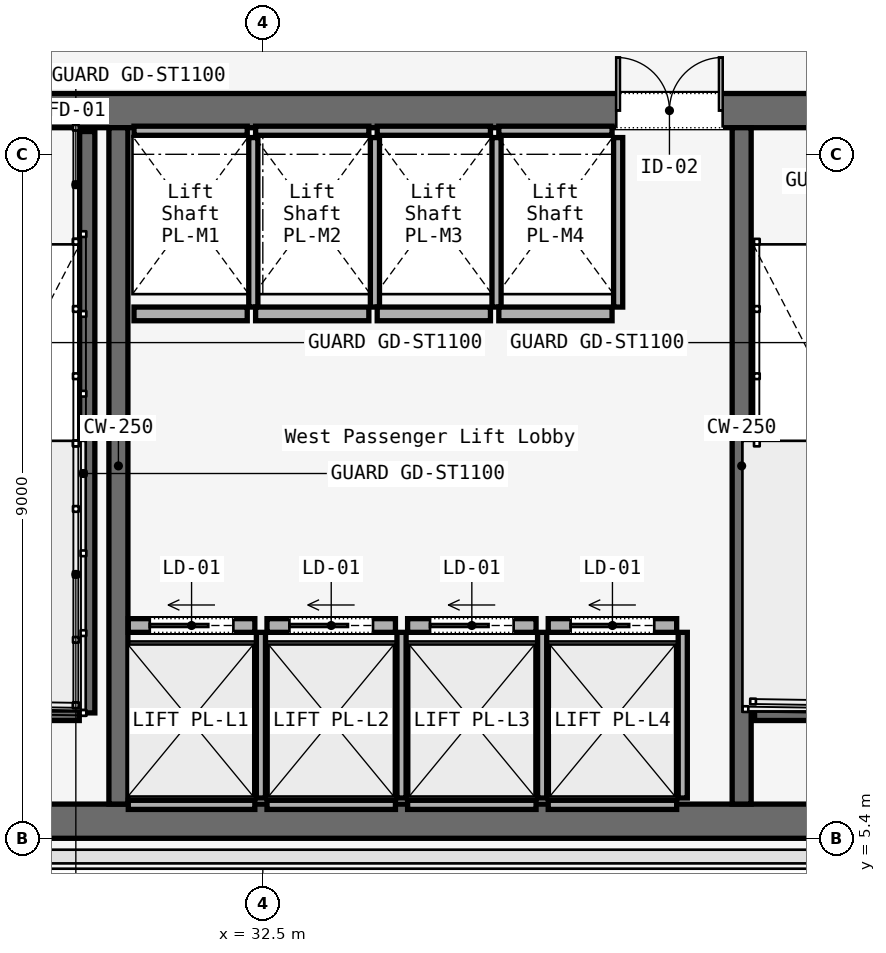
"""IFC4 building model, lengths in metres.
Left out: names, types, materials, properties, quantities, classifications, styles, units other than length and angle.
Written with IfcOpenShell. Run it as: python <this file> out.ifc"""

import sys

from ifc_helpers import new_model, si_unit, direction, frame, frame_2d, origin, place, context, subcontext, project, spatial, rectangle, extrude, element, fill, save


model = new_model("IFC4")
c1 = context("Model", 3, precision=1e-05, world=origin(), true_north=direction((0.0, 1.0)))
c2 = subcontext(c1, "Body", "Model", "MODEL_VIEW")
j1 = project(units=[si_unit("LENGTHUNIT", "METRE"), si_unit("PLANEANGLEUNIT", "RADIAN")], contexts=[c1])
p1 = place(None, origin())
s1 = spatial("IfcSite", under=j1, at=p1, CompositionType="ELEMENT")
p2 = place(p1, origin())
s2 = spatial("IfcBuilding", under=s1, at=p2, CompositionType="ELEMENT")
p3 = place(p2, frame((0.0, 0.0, 51.2)))
s3 = spatial("IfcBuildingStorey", under=s2, at=p3, CompositionType="ELEMENT", Elevation=51.2)
p4 = place(p3, frame((26.45, 14.975, 0.0), z_axis=(0.0, 0.0, 1.0), x_axis=(1.0, 0.0, 0.0)))
e1 = element("IfcWall", 1, at=p4, inside=s3, PredefinedType="SOLIDWALL", context=c2, shape_type="SweptSolid", body=[
    extrude(rectangle(XDim=31.1, YDim=0.45, at=frame_2d((15.55, 0.0))), origin(), (0.0, 0.0, 1.0), 3.58),
])
p5 = place(p4, frame((1.65, 0.0, 0.0)))
e2 = element("IfcOpeningElement", 2, at=p5, cuts=e1, PredefinedType="OPENING", context=c2, shape_type="SweptSolid", body=[
    extrude(rectangle(XDim=1.1, YDim=2.2, at=frame_2d((0.55, 1.1))), frame((0.0, 0.225, 0.0), z_axis=(0.0, -1.0, 0.0), x_axis=(1.0, 0.0, 0.0)), (0.0, 0.0, 1.0), 0.45),
])
p6 = place(p4, frame((13.65, 0.0, 0.0)))
e3 = element("IfcOpeningElement", 3, at=p6, cuts=e1, PredefinedType="OPENING", context=c2, shape_type="SweptSolid", body=[
    extrude(rectangle(XDim=1.1, YDim=2.2, at=frame_2d((0.55, 1.1))), frame((0.0, 0.225, 0.0), z_axis=(0.0, -1.0, 0.0), x_axis=(1.0, 0.0, 0.0)), (0.0, 0.0, 1.0), 0.45),
])
p7 = place(p4, frame((25.55, 0.0, 0.0)))
e4 = element("IfcOpeningElement", 4, at=p7, cuts=e1, PredefinedType="OPENING", context=c2, shape_type="SweptSolid", body=[
    extrude(rectangle(XDim=1.1, YDim=2.2, at=frame_2d((0.55, 1.1))), frame((0.0, 0.225, 0.0), z_axis=(0.0, -1.0, 0.0), x_axis=(1.0, 0.0, 0.0)), (0.0, 0.0, 1.0), 0.45),
])
p8 = place(p4, frame((10.7, 0.0, 0.0)))
e5 = element("IfcOpeningElement", 5, at=p8, cuts=e1, PredefinedType="OPENING", context=c2, shape_type="SweptSolid", body=[
    extrude(rectangle(XDim=1.4, YDim=2.2, at=frame_2d((0.7, 1.1))), frame((0.0, 0.225, 0.0), z_axis=(0.0, -1.0, 0.0), x_axis=(1.0, 0.0, 0.0)), (0.0, 0.0, 1.0), 0.45),
])
p9 = place(p4, frame((19.35, 0.0, 0.0)))
e6 = element("IfcOpeningElement", 6, at=p9, cuts=e1, PredefinedType="OPENING", context=c2, shape_type="SweptSolid", body=[
    extrude(rectangle(XDim=1.1, YDim=2.2, at=frame_2d((0.55, 1.1))), frame((0.0, 0.225, 0.0), z_axis=(0.0, -1.0, 0.0), x_axis=(1.0, 0.0, 0.0)), (0.0, 0.0, 1.0), 0.45),
])
p10 = place(p4, frame((21.4, 0.0, 0.0)))
e7 = element("IfcOpeningElement", 7, at=p10, cuts=e1, PredefinedType="OPENING", context=c2, shape_type="SweptSolid", body=[
    extrude(rectangle(XDim=0.9, YDim=2.1, at=frame_2d((0.45, 1.05))), frame((0.0, 0.225, 0.0), z_axis=(0.0, -1.0, 0.0), x_axis=(1.0, 0.0, 0.0)), (0.0, 0.0, 1.0), 0.45),
])
p11 = place(p4, frame((23.35, 0.0, 0.0)))
e8 = element("IfcOpeningElement", 8, at=p11, cuts=e1, PredefinedType="OPENING", context=c2, shape_type="SweptSolid", body=[
    extrude(rectangle(XDim=1.3, YDim=2.3, at=frame_2d((0.65, 1.15))), frame((0.0, 0.225, 0.0), z_axis=(0.0, -1.0, 0.0), x_axis=(1.0, 0.0, 0.0)), (0.0, 0.0, 1.0), 0.45),
])
p12 = place(p3, frame((26.45, 5.625, 0.0), z_axis=(0.0, 0.0, 1.0), x_axis=(1.0, 0.0, 0.0)))
e9 = element("IfcWall", 9, at=p12, inside=s3, PredefinedType="SOLIDWALL", context=c2, shape_type="SweptSolid", body=[
    extrude(rectangle(XDim=31.1, YDim=0.45, at=frame_2d((15.55, 0.0))), origin(), (0.0, 0.0, 1.0), 3.58),
])
for number, where, z_axis, x_axis in (
    (10, (30.6, 5.85, 0.0), (0.0, 0.0, 1.0), (0.0, 1.0, 0.0)),
    (11, (38.8, 5.85, 0.0), (0.0, 0.0, 1.0), (0.0, 1.0, 0.0)),
):
    element("IfcWall", number, at=place(p3, frame(where, z_axis=z_axis, x_axis=x_axis)), inside=s3, PredefinedType="SOLIDWALL", context=c2, shape_type="SweptSolid", body=[
        extrude(rectangle(XDim=8.9, YDim=0.25, at=frame_2d((4.45, 0.0))), origin(), (0.0, 0.0, 1.0), 3.58),
    ])
p13 = place(p3, frame((30.19, 14.7, 0.0), z_axis=(0.0, 0.0, 1.0), x_axis=(0.0, -1.0, 0.0)))
e12 = element("IfcWall", 12, at=p13, inside=s3, PredefinedType="SOLIDWALL", context=c2, shape_type="SweptSolid", body=[
    extrude(rectangle(XDim=7.65, YDim=0.2, at=frame_2d((3.825, 0.0))), origin(), (0.0, 0.0, 1.0), 3.8),
])
for number, where, z_axis, x_axis in (
    (13, (26.97, 7.05, 0.0), (0.0, 0.0, 1.0), (1.0, 0.0, 0.0)),
    (14, (38.97, 7.05, 0.0), (0.0, 0.0, 1.0), (1.0, 0.0, 0.0)),
):
    element("IfcWall", number, at=place(p3, frame(where, z_axis=z_axis, x_axis=x_axis)), inside=s3, PredefinedType="SOLIDWALL", context=c2, shape_type="SweptSolid", body=[
        extrude(rectangle(XDim=3.115, YDim=0.2, at=frame_2d((1.558, 0.0))), origin(), (0.0, 0.0, 1.0), 3.8),
    ])
p14 = place(p3, frame((30.73, 8.2, 0.0), z_axis=(0.0, 0.0, 1.0), x_axis=(1.0, 0.0, 0.0)))
e15 = element("IfcWall", 15, at=p14, inside=s3, PredefinedType="SOLIDWALL", context=c2, shape_type="SweptSolid", body=[
    extrude(rectangle(XDim=1.665, YDim=0.18, at=frame_2d((0.833, 0.0))), origin(), (0.0, 0.0, 1.0), 2.933),
])
p15 = place(p14, frame((0.282, 0.0, 0.0)))
e16 = element("IfcOpeningElement", 16, at=p15, cuts=e15, PredefinedType="OPENING", context=c2, shape_type="SweptSolid", body=[
    extrude(rectangle(XDim=1.1, YDim=2.2, at=frame_2d((0.55, 1.1))), frame((0.0, 0.09, 0.0), z_axis=(0.0, -1.0, 0.0), x_axis=(1.0, 0.0, 0.0)), (0.0, 0.0, 1.0), 0.18),
])
p16 = place(p3, frame((30.73, 5.84, 0.0), z_axis=(0.0, 0.0, 1.0), x_axis=(1.0, 0.0, 0.0)))
e17 = element("IfcWall", 17, at=p16, inside=s3, PredefinedType="SOLIDWALL", context=c2, shape_type="SweptSolid", body=[
    extrude(rectangle(XDim=1.665, YDim=0.12, at=frame_2d((0.833, 0.0))), origin(), (0.0, 0.0, 1.0), 2.933),
])
p17 = place(p3, frame((32.475, 5.93, 0.0), z_axis=(0.0, 0.0, 1.0), x_axis=(0.0, 1.0, 0.0)))
e18 = element("IfcWall", 18, at=p17, inside=s3, PredefinedType="SOLIDWALL", context=c2, shape_type="SweptSolid", body=[
    extrude(rectangle(XDim=2.18, YDim=0.12, at=frame_2d((1.09, 0.0))), origin(), (0.0, 0.0, 1.0), 2.933),
])
p18 = place(p3, frame((32.555, 8.2, 0.0), z_axis=(0.0, 0.0, 1.0), x_axis=(1.0, 0.0, 0.0)))
e19 = element("IfcWall", 19, at=p18, inside=s3, PredefinedType="SOLIDWALL", context=c2, shape_type="SweptSolid", body=[
    extrude(rectangle(XDim=1.69, YDim=0.18, at=frame_2d((0.845, 0.0))), origin(), (0.0, 0.0, 1.0), 2.933),
])
p19 = place(p18, frame((0.295, 0.0, 0.0)))
e20 = element("IfcOpeningElement", 20, at=p19, cuts=e19, PredefinedType="OPENING", context=c2, shape_type="SweptSolid", body=[
    extrude(rectangle(XDim=1.1, YDim=2.2, at=frame_2d((0.55, 1.1))), frame((0.0, 0.09, 0.0), z_axis=(0.0, -1.0, 0.0), x_axis=(1.0, 0.0, 0.0)), (0.0, 0.0, 1.0), 0.18),
])
p20 = place(p3, frame((32.555, 5.84, 0.0), z_axis=(0.0, 0.0, 1.0), x_axis=(1.0, 0.0, 0.0)))
e21 = element("IfcWall", 21, at=p20, inside=s3, PredefinedType="SOLIDWALL", context=c2, shape_type="SweptSolid", body=[
    extrude(rectangle(XDim=1.69, YDim=0.12, at=frame_2d((0.845, 0.0))), origin(), (0.0, 0.0, 1.0), 2.933),
])
p21 = place(p3, frame((34.325, 5.93, 0.0), z_axis=(0.0, 0.0, 1.0), x_axis=(0.0, 1.0, 0.0)))
e22 = element("IfcWall", 22, at=p21, inside=s3, PredefinedType="SOLIDWALL", context=c2, shape_type="SweptSolid", body=[
    extrude(rectangle(XDim=2.18, YDim=0.12, at=frame_2d((1.09, 0.0))), origin(), (0.0, 0.0, 1.0), 2.933),
])
p22 = place(p3, frame((34.405, 8.2, 0.0), z_axis=(0.0, 0.0, 1.0), x_axis=(1.0, 0.0, 0.0)))
e23 = element("IfcWall", 23, at=p22, inside=s3, PredefinedType="SOLIDWALL", context=c2, shape_type="SweptSolid", body=[
    extrude(rectangle(XDim=1.69, YDim=0.18, at=frame_2d((0.845, 0.0))), origin(), (0.0, 0.0, 1.0), 2.933),
])
p23 = place(p22, frame((0.295, 0.0, 0.0)))
e24 = element("IfcOpeningElement", 24, at=p23, cuts=e23, PredefinedType="OPENING", context=c2, shape_type="SweptSolid", body=[
    extrude(rectangle(XDim=1.1, YDim=2.2, at=frame_2d((0.55, 1.1))), frame((0.0, 0.09, 0.0), z_axis=(0.0, -1.0, 0.0), x_axis=(1.0, 0.0, 0.0)), (0.0, 0.0, 1.0), 0.18),
])
p24 = place(p3, frame((34.405, 5.84, 0.0), z_axis=(0.0, 0.0, 1.0), x_axis=(1.0, 0.0, 0.0)))
e25 = element("IfcWall", 25, at=p24, inside=s3, PredefinedType="SOLIDWALL", context=c2, shape_type="SweptSolid", body=[
    extrude(rectangle(XDim=1.69, YDim=0.12, at=frame_2d((0.845, 0.0))), origin(), (0.0, 0.0, 1.0), 2.933),
])
p25 = place(p3, frame((36.175, 5.93, 0.0), z_axis=(0.0, 0.0, 1.0), x_axis=(0.0, 1.0, 0.0)))
e26 = element("IfcWall", 26, at=p25, inside=s3, PredefinedType="SOLIDWALL", context=c2, shape_type="SweptSolid", body=[
    extrude(rectangle(XDim=2.18, YDim=0.12, at=frame_2d((1.09, 0.0))), origin(), (0.0, 0.0, 1.0), 2.933),
])
p26 = place(p3, frame((36.255, 8.2, 0.0), z_axis=(0.0, 0.0, 1.0), x_axis=(1.0, 0.0, 0.0)))
e27 = element("IfcWall", 27, at=p26, inside=s3, PredefinedType="SOLIDWALL", context=c2, shape_type="SweptSolid", body=[
    extrude(rectangle(XDim=1.69, YDim=0.18, at=frame_2d((0.845, 0.0))), origin(), (0.0, 0.0, 1.0), 2.933),
])
p27 = place(p26, frame((0.295, 0.0, 0.0)))
e28 = element("IfcOpeningElement", 28, at=p27, cuts=e27, PredefinedType="OPENING", context=c2, shape_type="SweptSolid", body=[
    extrude(rectangle(XDim=1.1, YDim=2.2, at=frame_2d((0.55, 1.1))), frame((0.0, 0.09, 0.0), z_axis=(0.0, -1.0, 0.0), x_axis=(1.0, 0.0, 0.0)), (0.0, 0.0, 1.0), 0.18),
])
p28 = place(p3, frame((36.255, 5.84, 0.0), z_axis=(0.0, 0.0, 1.0), x_axis=(1.0, 0.0, 0.0)))
e29 = element("IfcWall", 29, at=p28, inside=s3, PredefinedType="SOLIDWALL", context=c2, shape_type="SweptSolid", body=[
    extrude(rectangle(XDim=1.69, YDim=0.12, at=frame_2d((0.845, 0.0))), origin(), (0.0, 0.0, 1.0), 2.933),
])
p29 = place(p3, frame((38.025, 5.93, 0.0), z_axis=(0.0, 0.0, 1.0), x_axis=(0.0, 1.0, 0.0)))
e30 = element("IfcWall", 30, at=p29, inside=s3, PredefinedType="SOLIDWALL", context=c2, shape_type="SweptSolid", body=[
    extrude(rectangle(XDim=2.18, YDim=0.12, at=frame_2d((1.09, 0.0))), origin(), (0.0, 0.0, 1.0), 2.933),
])
p30 = place(p3, frame((30.805, 12.3, 0.0), z_axis=(0.0, 0.0, 1.0), x_axis=(1.0, 0.0, 0.0)))
e31 = element("IfcWall", 31, at=p30, inside=s3, PredefinedType="SOLIDWALL", context=c2, shape_type="SweptSolid", body=[
    extrude(rectangle(XDim=1.49, YDim=0.18, at=frame_2d((0.745, 0.0))), origin(), (0.0, 0.0, 1.0), 2.933),
])
p31 = place(p3, frame((30.805, 14.71, 0.0), z_axis=(0.0, 0.0, 1.0), x_axis=(1.0, 0.0, 0.0)))
e32 = element("IfcWall", 32, at=p31, inside=s3, PredefinedType="SOLIDWALL", context=c2, shape_type="SweptSolid", body=[
    extrude(rectangle(XDim=1.49, YDim=0.12, at=frame_2d((0.745, 0.0))), origin(), (0.0, 0.0, 1.0), 2.933),
])
p32 = place(p3, frame((32.375, 12.39, 0.0), z_axis=(0.0, 0.0, 1.0), x_axis=(0.0, 1.0, 0.0)))
e33 = element("IfcWall", 33, at=p32, inside=s3, PredefinedType="SOLIDWALL", context=c2, shape_type="SweptSolid", body=[
    extrude(rectangle(XDim=2.23, YDim=0.12, at=frame_2d((1.115, 0.0))), origin(), (0.0, 0.0, 1.0), 2.933),
])
p33 = place(p3, frame((32.405, 12.3, 0.0), z_axis=(0.0, 0.0, 1.0), x_axis=(1.0, 0.0, 0.0)))
e34 = element("IfcWall", 34, at=p33, inside=s3, PredefinedType="SOLIDWALL", context=c2, shape_type="SweptSolid", body=[
    extrude(rectangle(XDim=1.49, YDim=0.18, at=frame_2d((0.745, 0.0))), origin(), (0.0, 0.0, 1.0), 2.933),
])
p34 = place(p3, frame((32.405, 14.71, 0.0), z_axis=(0.0, 0.0, 1.0), x_axis=(1.0, 0.0, 0.0)))
e35 = element("IfcWall", 35, at=p34, inside=s3, PredefinedType="SOLIDWALL", context=c2, shape_type="SweptSolid", body=[
    extrude(rectangle(XDim=1.49, YDim=0.12, at=frame_2d((0.745, 0.0))), origin(), (0.0, 0.0, 1.0), 2.933),
])
p35 = place(p3, frame((33.975, 12.39, 0.0), z_axis=(0.0, 0.0, 1.0), x_axis=(0.0, 1.0, 0.0)))
e36 = element("IfcWall", 36, at=p35, inside=s3, PredefinedType="SOLIDWALL", context=c2, shape_type="SweptSolid", body=[
    extrude(rectangle(XDim=2.23, YDim=0.12, at=frame_2d((1.115, 0.0))), origin(), (0.0, 0.0, 1.0), 2.933),
])
p36 = place(p3, frame((34.005, 12.3, 0.0), z_axis=(0.0, 0.0, 1.0), x_axis=(1.0, 0.0, 0.0)))
e37 = element("IfcWall", 37, at=p36, inside=s3, PredefinedType="SOLIDWALL", context=c2, shape_type="SweptSolid", body=[
    extrude(rectangle(XDim=1.49, YDim=0.18, at=frame_2d((0.745, 0.0))), origin(), (0.0, 0.0, 1.0), 2.933),
])
p37 = place(p3, frame((34.005, 14.71, 0.0), z_axis=(0.0, 0.0, 1.0), x_axis=(1.0, 0.0, 0.0)))
e38 = element("IfcWall", 38, at=p37, inside=s3, PredefinedType="SOLIDWALL", context=c2, shape_type="SweptSolid", body=[
    extrude(rectangle(XDim=1.49, YDim=0.12, at=frame_2d((0.745, 0.0))), origin(), (0.0, 0.0, 1.0), 2.933),
])
p38 = place(p3, frame((35.575, 12.39, 0.0), z_axis=(0.0, 0.0, 1.0), x_axis=(0.0, 1.0, 0.0)))
e39 = element("IfcWall", 39, at=p38, inside=s3, PredefinedType="SOLIDWALL", context=c2, shape_type="SweptSolid", body=[
    extrude(rectangle(XDim=2.23, YDim=0.12, at=frame_2d((1.115, 0.0))), origin(), (0.0, 0.0, 1.0), 2.933),
])
p39 = place(p3, frame((35.605, 12.3, 0.0), z_axis=(0.0, 0.0, 1.0), x_axis=(1.0, 0.0, 0.0)))
e40 = element("IfcWall", 40, at=p39, inside=s3, PredefinedType="SOLIDWALL", context=c2, shape_type="SweptSolid", body=[
    extrude(rectangle(XDim=1.49, YDim=0.18, at=frame_2d((0.745, 0.0))), origin(), (0.0, 0.0, 1.0), 2.933),
])
p40 = place(p3, frame((35.605, 14.71, 0.0), z_axis=(0.0, 0.0, 1.0), x_axis=(1.0, 0.0, 0.0)))
e41 = element("IfcWall", 41, at=p40, inside=s3, PredefinedType="SOLIDWALL", context=c2, shape_type="SweptSolid", body=[
    extrude(rectangle(XDim=1.49, YDim=0.12, at=frame_2d((0.745, 0.0))), origin(), (0.0, 0.0, 1.0), 2.933),
])
p41 = place(p3, frame((37.175, 12.39, 0.0), z_axis=(0.0, 0.0, 1.0), x_axis=(0.0, 1.0, 0.0)))
e42 = element("IfcWall", 42, at=p41, inside=s3, PredefinedType="SOLIDWALL", context=c2, shape_type="SweptSolid", body=[
    extrude(rectangle(XDim=2.23, YDim=0.12, at=frame_2d((1.115, 0.0))), origin(), (0.0, 0.0, 1.0), 2.933),
])
p42 = place(p8, origin())
e43 = element("IfcDoor", 43, at=p42, inside=s3, OperationType="DOUBLE_DOOR_SINGLE_SWING", PredefinedType="DOOR", context=c2, shape_type="SweptSolid", body=[
    extrude(rectangle(XDim=1.4, YDim=2.2, at=frame_2d((0.7, 1.1))), frame((0.0, 0.025, 0.0), z_axis=(0.0, -1.0, 0.0), x_axis=(1.0, 0.0, 0.0)), (0.0, 0.0, 1.0), 0.05),
])
fill(e5, e43)
p43 = place(p15, origin())
e44 = element("IfcDoor", 44, at=p43, inside=s3, OperationType="SLIDING_TO_LEFT", PredefinedType="DOOR", context=c2, shape_type="SweptSolid", body=[
    extrude(rectangle(XDim=1.1, YDim=2.2, at=frame_2d((0.55, 1.1))), frame((0.0, 0.025, 0.0), z_axis=(0.0, -1.0, 0.0), x_axis=(1.0, 0.0, 0.0)), (0.0, 0.0, 1.0), 0.05),
])
fill(e16, e44)
p44 = place(p19, origin())
e45 = element("IfcDoor", 45, at=p44, inside=s3, OperationType="SLIDING_TO_LEFT", PredefinedType="DOOR", context=c2, shape_type="SweptSolid", body=[
    extrude(rectangle(XDim=1.1, YDim=2.2, at=frame_2d((0.55, 1.1))), frame((0.0, 0.025, 0.0), z_axis=(0.0, -1.0, 0.0), x_axis=(1.0, 0.0, 0.0)), (0.0, 0.0, 1.0), 0.05),
])
fill(e20, e45)
p45 = place(p23, origin())
e46 = element("IfcDoor", 46, at=p45, inside=s3, OperationType="SLIDING_TO_LEFT", PredefinedType="DOOR", context=c2, shape_type="SweptSolid", body=[
    extrude(rectangle(XDim=1.1, YDim=2.2, at=frame_2d((0.55, 1.1))), frame((0.0, 0.025, 0.0), z_axis=(0.0, -1.0, 0.0), x_axis=(1.0, 0.0, 0.0)), (0.0, 0.0, 1.0), 0.05),
])
fill(e24, e46)
p46 = place(p27, origin())
e47 = element("IfcDoor", 47, at=p46, inside=s3, OperationType="SLIDING_TO_LEFT", PredefinedType="DOOR", context=c2, shape_type="SweptSolid", body=[
    extrude(rectangle(XDim=1.1, YDim=2.2, at=frame_2d((0.55, 1.1))), frame((0.0, 0.025, 0.0), z_axis=(0.0, -1.0, 0.0), x_axis=(1.0, 0.0, 0.0)), (0.0, 0.0, 1.0), 0.05),
])
fill(e28, e47)
save(model, sys.argv[1])
